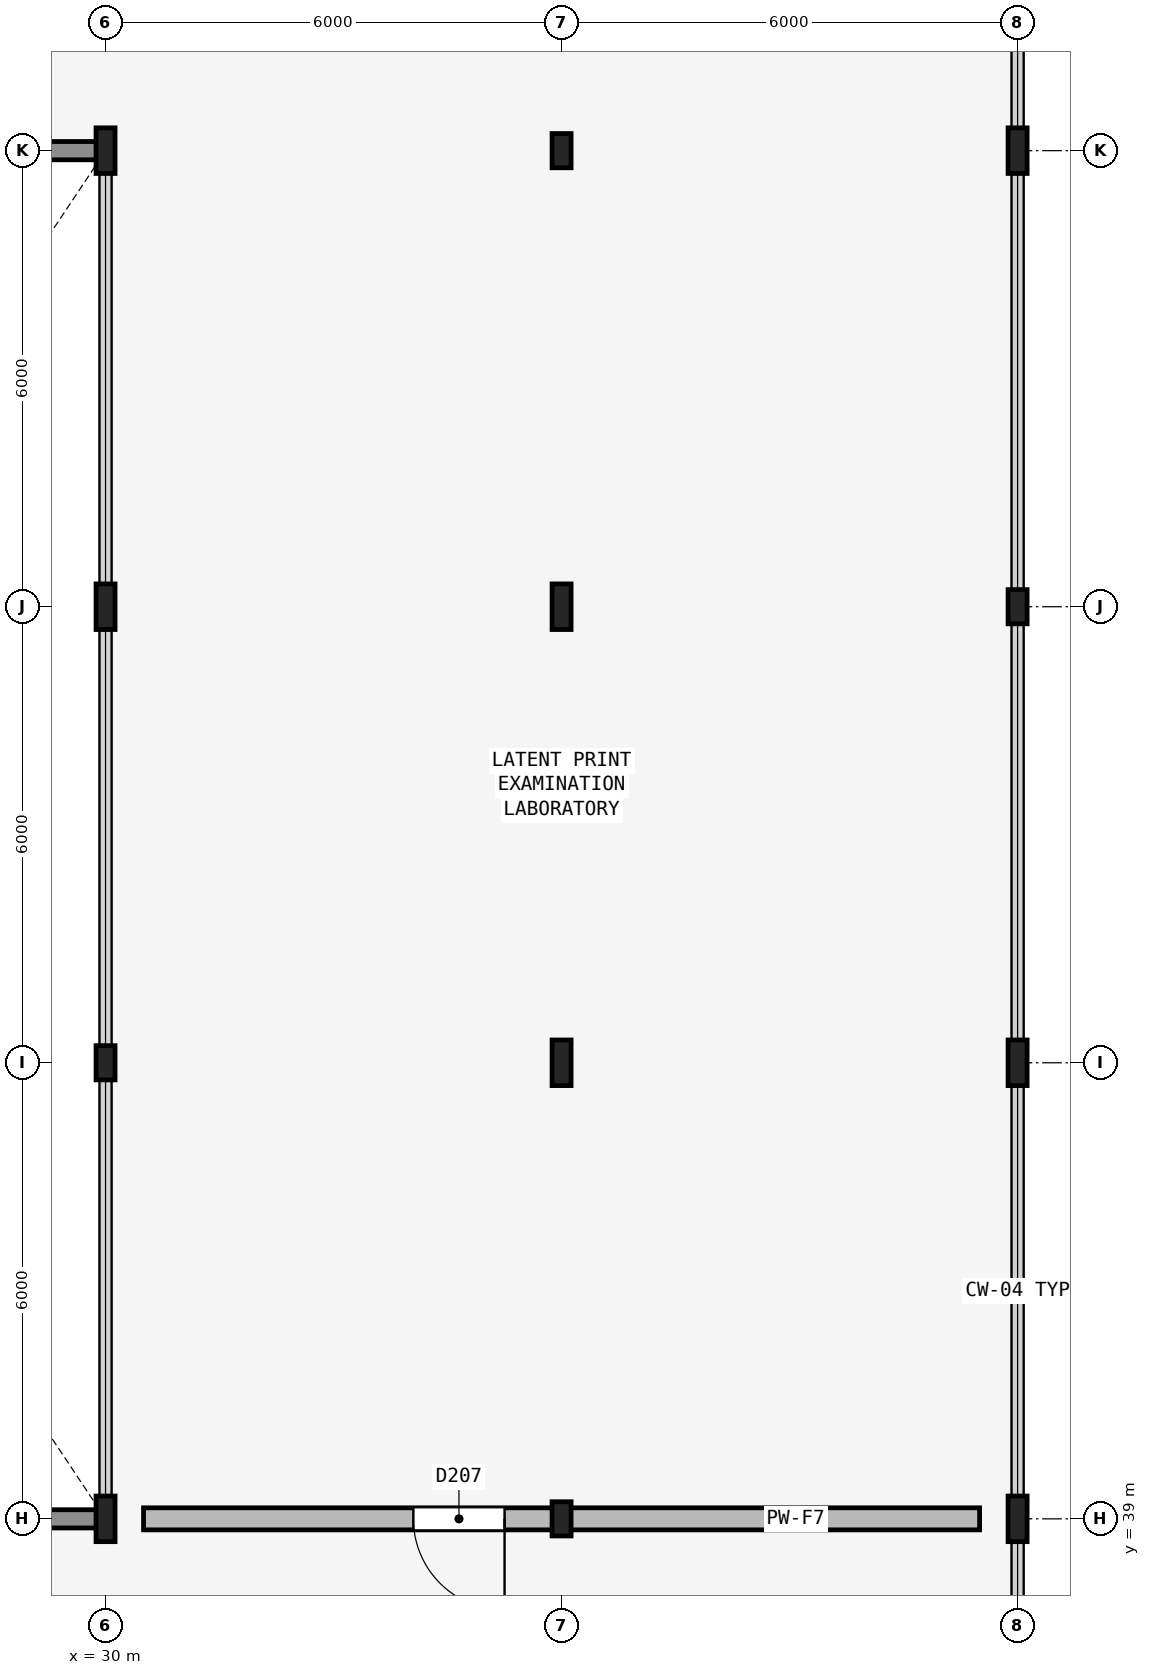
"""IFC4 building model, lengths in metres.
Left out: names, types, materials, properties, quantities, classifications, styles, units other than length and angle.
Written with IfcOpenShell. Run it as: python <this file> out.ifc"""

import sys

from ifc_helpers import new_model, si_unit, direction, frame, frame_2d, origin, origin_2d, place, context, subcontext, project, spatial, rectangle, i_section, extrude, element, fill, save


model = new_model("IFC4")
c1 = context("Model", 3, precision=1e-05, world=origin(), true_north=direction((0.0, 1.0)))
c2 = subcontext(c1, "Body", "Model", "MODEL_VIEW")
j1 = project(units=[si_unit("LENGTHUNIT", "METRE"), si_unit("PLANEANGLEUNIT", "RADIAN")], contexts=[c1])
p1 = place(None, origin())
s1 = spatial("IfcSite", under=j1, at=p1, CompositionType="ELEMENT")
p2 = place(p1, origin())
s2 = spatial("IfcBuilding", under=s1, at=p2, CompositionType="ELEMENT")
p3 = place(p2, frame((0.0, 0.0, 4.8)))
s3 = spatial("IfcBuildingStorey", under=s2, at=p3, CompositionType="ELEMENT", Elevation=4.8)
p4 = place(p3, frame((30.0, 39.0, 0.0), z_axis=(0.0, 0.0, 1.0), x_axis=(1.0, 0.0, 0.0)))
e1 = element("IfcColumn", 1, at=p4, inside=s3, PredefinedType="COLUMN", context=c2, shape_type="SweptSolid", body=[
    extrude(i_section(OverallWidth=0.25, OverallDepth=0.6, WebThickness=0.012, FlangeThickness=0.024, FilletRadius=0.017, at=origin_2d()), origin(), (0.0, 0.0, 1.0), 4.5),
])
p5 = place(p3, frame((30.0, 45.0, 0.0), z_axis=(0.0, 0.0, 1.0), x_axis=(1.0, 0.0, 0.0)))
e2 = element("IfcColumn", 2, at=p5, inside=s3, PredefinedType="COLUMN", context=c2, shape_type="SweptSolid", body=[
    extrude(i_section(OverallWidth=0.25, OverallDepth=0.45, WebThickness=0.011, FlangeThickness=0.014, FilletRadius=0.015, at=origin_2d()), origin(), (0.0, 0.0, 1.0), 4.5),
])
for number, where, z_axis, x_axis in (
    (3, (30.0, 51.0, 0.0), (0.0, 0.0, 1.0), (1.0, 0.0, 0.0)),
    (4, (30.0, 57.0, 0.0), (0.0, 0.0, 1.0), (1.0, 0.0, 0.0)),
):
    element("IfcColumn", number, at=place(p3, frame(where, z_axis=z_axis, x_axis=x_axis)), inside=s3, PredefinedType="COLUMN", context=c2, shape_type="SweptSolid", body=[
        extrude(i_section(OverallWidth=0.25, OverallDepth=0.6, WebThickness=0.012, FlangeThickness=0.024, FilletRadius=0.017, at=origin_2d()), origin(), (0.0, 0.0, 1.0), 4.5),
    ])
p6 = place(p3, frame((36.0, 39.0, 0.0), z_axis=(0.0, 0.0, 1.0), x_axis=(1.0, 0.0, 0.0)))
e5 = element("IfcColumn", 5, at=p6, inside=s3, PredefinedType="COLUMN", context=c2, shape_type="SweptSolid", body=[
    extrude(i_section(OverallWidth=0.25, OverallDepth=0.45, WebThickness=0.011, FlangeThickness=0.014, FilletRadius=0.015, at=origin_2d()), origin(), (0.0, 0.0, 1.0), 4.5),
])
for number, where, z_axis, x_axis in (
    (6, (36.0, 45.0, 0.0), (0.0, 0.0, 1.0), (1.0, 0.0, 0.0)),
    (7, (36.0, 51.0, 0.0), (0.0, 0.0, 1.0), (1.0, 0.0, 0.0)),
):
    element("IfcColumn", number, at=place(p3, frame(where, z_axis=z_axis, x_axis=x_axis)), inside=s3, PredefinedType="COLUMN", context=c2, shape_type="SweptSolid", body=[
        extrude(i_section(OverallWidth=0.25, OverallDepth=0.6, WebThickness=0.012, FlangeThickness=0.024, FilletRadius=0.017, at=origin_2d()), origin(), (0.0, 0.0, 1.0), 4.5),
    ])
p7 = place(p3, frame((36.0, 57.0, 0.0), z_axis=(0.0, 0.0, 1.0), x_axis=(1.0, 0.0, 0.0)))
e8 = element("IfcColumn", 8, at=p7, inside=s3, PredefinedType="COLUMN", context=c2, shape_type="SweptSolid", body=[
    extrude(i_section(OverallWidth=0.25, OverallDepth=0.45, WebThickness=0.011, FlangeThickness=0.014, FilletRadius=0.015, at=origin_2d()), origin(), (0.0, 0.0, 1.0), 4.5),
])
for number, where, z_axis, x_axis in (
    (9, (42.0, 39.0, 0.0), (0.0, 0.0, 1.0), (1.0, 0.0, 0.0)),
    (10, (42.0, 45.0, 0.0), (0.0, 0.0, 1.0), (1.0, 0.0, 0.0)),
):
    element("IfcColumn", number, at=place(p3, frame(where, z_axis=z_axis, x_axis=x_axis)), inside=s3, PredefinedType="COLUMN", context=c2, shape_type="SweptSolid", body=[
        extrude(i_section(OverallWidth=0.25, OverallDepth=0.6, WebThickness=0.012, FlangeThickness=0.024, FilletRadius=0.017, at=origin_2d()), origin(), (0.0, 0.0, 1.0), 4.5),
    ])
p8 = place(p3, frame((42.0, 51.0, 0.0), z_axis=(0.0, 0.0, 1.0), x_axis=(1.0, 0.0, 0.0)))
e11 = element("IfcColumn", 11, at=p8, inside=s3, PredefinedType="COLUMN", context=c2, shape_type="SweptSolid", body=[
    extrude(i_section(OverallWidth=0.25, OverallDepth=0.45, WebThickness=0.011, FlangeThickness=0.014, FilletRadius=0.015, at=origin_2d()), origin(), (0.0, 0.0, 1.0), 4.5),
])
p9 = place(p3, frame((42.0, 57.0, 0.0), z_axis=(0.0, 0.0, 1.0), x_axis=(1.0, 0.0, 0.0)))
e12 = element("IfcColumn", 12, at=p9, inside=s3, PredefinedType="COLUMN", context=c2, shape_type="SweptSolid", body=[
    extrude(i_section(OverallWidth=0.25, OverallDepth=0.6, WebThickness=0.012, FlangeThickness=0.024, FilletRadius=0.017, at=origin_2d()), origin(), (0.0, 0.0, 1.0), 4.5),
])
p10 = place(p3, frame((24.0, 39.0, 0.0), z_axis=(0.0, 0.0, 1.0), x_axis=(1.0, 0.0, 0.0)))
e13 = element("IfcWall", 13, at=p10, inside=s3, PredefinedType="SOLIDWALL", context=c2, shape_type="SweptSolid", body=[
    extrude(rectangle(XDim=5.95, YDim=0.24, at=frame_2d((2.975, 0.0))), origin(), (0.0, 0.0, 1.0), 3.783),
])
p11 = place(p10, frame((2.275, 0.0, 0.85)))
e14 = element("IfcOpeningElement", 14, at=p11, cuts=e13, PredefinedType="OPENING", context=c2, shape_type="SweptSolid", body=[
    extrude(rectangle(XDim=1.4, YDim=1.8, at=frame_2d((0.7, 0.9))), frame((0.0, 0.13, 0.0), z_axis=(0.0, -1.0, 0.0), x_axis=(1.0, 0.0, 0.0)), (0.0, 0.0, 1.0), 0.26),
])
p12 = place(p3, frame((24.0, 57.0, 0.0), z_axis=(0.0, 0.0, 1.0), x_axis=(1.0, 0.0, 0.0)))
e15 = element("IfcWall", 15, at=p12, inside=s3, PredefinedType="SOLIDWALL", context=c2, shape_type="SweptSolid", body=[
    extrude(rectangle(XDim=5.95, YDim=0.24, at=frame_2d((2.975, 0.0))), origin(), (0.0, 0.0, 1.0), 3.59),
])
p13 = place(p12, frame((2.275, 0.0, 0.85)))
e16 = element("IfcOpeningElement", 16, at=p13, cuts=e15, PredefinedType="OPENING", context=c2, shape_type="SweptSolid", body=[
    extrude(rectangle(XDim=1.4, YDim=1.8, at=frame_2d((0.7, 0.9))), frame((0.0, 0.13, 0.0), z_axis=(0.0, -1.0, 0.0), x_axis=(1.0, 0.0, 0.0)), (0.0, 0.0, 1.0), 0.26),
])
p14 = place(p3, frame((41.5, 39.0, 0.0), z_axis=(0.0, 0.0, 1.0), x_axis=(-1.0, 0.0, 0.0)))
e17 = element("IfcWall", 17, at=p14, inside=s3, PredefinedType="PARTITIONING", context=c2, shape_type="SweptSolid", body=[
    extrude(rectangle(XDim=11.0, YDim=0.29, at=frame_2d((5.5, 0.0))), origin(), (0.0, 0.0, 1.0), 3.783),
])
p15 = place(p14, frame((6.25, 0.0, 0.0)))
e18 = element("IfcOpeningElement", 18, at=p15, cuts=e17, PredefinedType="OPENING", context=c2, shape_type="SweptSolid", body=[
    extrude(rectangle(XDim=1.2, YDim=2.15, at=frame_2d((0.6, 1.075))), frame((0.0, 0.155, 0.0), z_axis=(0.0, -1.0, 0.0), x_axis=(1.0, 0.0, 0.0)), (0.0, 0.0, 1.0), 0.31),
])
p16 = place(p15, origin())
e19 = element("IfcDoor", 19, at=p16, inside=s3, OperationType="SINGLE_SWING_LEFT", PredefinedType="DOOR", context=c2, shape_type="SweptSolid", body=[
    extrude(rectangle(XDim=1.2, YDim=2.15, at=frame_2d((0.6, 1.075))), frame((0.0, 0.025, 0.0), z_axis=(0.0, -1.0, 0.0), x_axis=(1.0, 0.0, 0.0)), (0.0, 0.0, 1.0), 0.05),
])
fill(e18, e19)
save(model, sys.argv[1])
